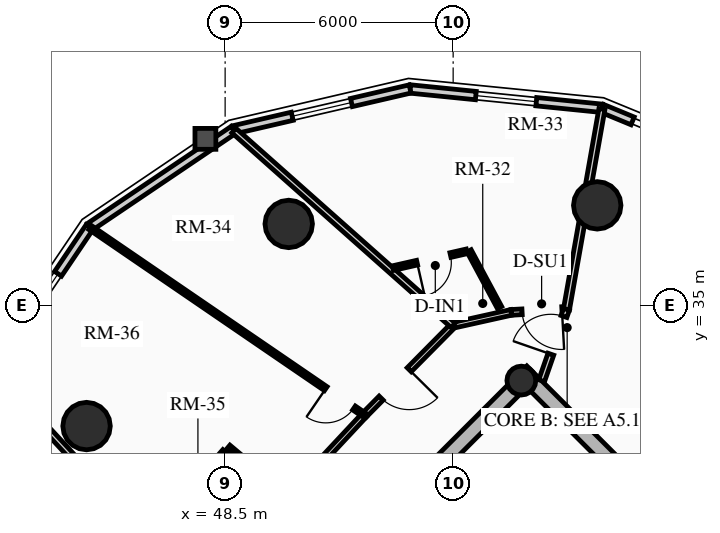
"""IFC4 building model, lengths in metres.
Left out: names, types, materials, properties, quantities, classifications, styles, units other than length and angle.
Written with IfcOpenShell. Run it as: python <this file> out.ifc"""

import sys

from ifc_helpers import new_model, si_unit, direction, frame, frame_2d, origin, origin_2d, place, context, subcontext, project, spatial, rectangle, circle, hollow_circle, extrude, source, transform, mapped, element, fill, save


model = new_model("IFC4")
c1 = context("Model", 3, precision=1e-05, world=origin(), true_north=direction((0.0, 1.0)))
c2 = subcontext(c1, "Body", "Model", "MODEL_VIEW")
j1 = project(units=[si_unit("LENGTHUNIT", "METRE"), si_unit("PLANEANGLEUNIT", "RADIAN")], contexts=[c1])
p1 = place(None, origin())
s1 = spatial("IfcSite", under=j1, at=p1, CompositionType="ELEMENT")
p2 = place(p1, origin())
s2 = spatial("IfcBuilding", under=s1, at=p2, CompositionType="ELEMENT")
p3 = place(p2, frame((0.0, 0.0, 157.42)))
s3 = spatial("IfcBuildingStorey", under=s2, at=p3, CompositionType="ELEMENT", Elevation=157.42)
p4 = place(p3, frame((66.268, 23.298, 0.0), z_axis=(0.0, 0.0, 1.0), x_axis=(-0.707106781187, 0.707106781187, 0.0)))
e1 = element("IfcWall", 1, at=p4, inside=s3, PredefinedType="SHEAR", context=c2, shape_type="SweptSolid", body=[
    extrude(rectangle(XDim=14.1, YDim=0.4, at=frame_2d((7.05, 0.0))), origin(), (0.0, 0.0, 1.0), 2.91),
])
p5 = place(p3, frame((48.873, 25.561, 0.0), z_axis=(0.0, 0.0, 1.0), x_axis=(0.707106781187, 0.707106781187, 0.0)))
e2 = element("IfcWall", 2, at=p5, inside=s3, PredefinedType="SHEAR", context=c2, shape_type="SweptSolid", body=[
    extrude(rectangle(XDim=10.7, YDim=0.4, at=frame_2d((5.35, 0.0))), origin(), (0.0, 0.0, 1.0), 2.91),
])
m1 = source(origin(), c2, "Body", "SweptSolid", [
    extrude(rectangle(XDim=1.5, YDim=2.02, at=frame_2d((0.75, 1.01))), frame((0.0, 0.21, 0.0), z_axis=(0.0, -1.0, 0.0), x_axis=(1.0, 0.0, 0.0)), (0.0, 0.0, 1.0), 0.42),
])
p6 = place(p5, frame((4.6, 0.0, 0.0)))
e3 = element("IfcOpeningElement", 3, at=p6, cuts=e2, PredefinedType="OPENING", context=c2, shape_type="MappedRepresentation", body=[
    mapped(m1, transform((0.0, 0.0, 0.0), x_axis=(1.0, 0.0, 0.0), y_axis=(0.0, 1.0, 0.0), z_axis=(0.0, 0.0, 1.0), scale=1.0)),
])
p7 = place(p3, frame((56.294, 33.024, 0.0), z_axis=(0.0, 0.0, 1.0), x_axis=(0.707106781187, 0.707106781187, 0.0)))
e4 = element("IfcColumn", 4, at=p7, inside=s3, PredefinedType="COLUMN", context=c2, shape_type="SweptSolid", body=[
    extrude(hollow_circle(Radius=0.38, WallThickness=0.032, at=origin_2d()), origin(), (0.0, 0.0, 1.0), 2.91),
])
for number, where, z_axis, x_axis in (
    (5, (58.291, 37.635, 0.0), (0.0, 0.0, 1.0), (1.0, 0.0, 0.0)),
    (6, (50.173, 37.146, 0.0), (0.0, 0.0, 1.0), (1.0, 0.0, 0.0)),
    (7, (44.854, 31.827, 0.0), (0.0, 0.0, 1.0), (1.0, 0.0, 0.0)),
):
    element("IfcColumn", number, at=place(p3, frame(where, z_axis=z_axis, x_axis=x_axis)), inside=s3, PredefinedType="USERDEFINED", context=c2, shape_type="SweptSolid", body=[
        extrude(circle(Radius=0.625, at=origin_2d()), origin(), (0.0, 0.0, 1.0), 2.91),
    ])
p8 = place(p3, frame((58.418, 40.189, 0.0), z_axis=(0.0, 0.0, 1.0), x_axis=(0.924556017656, -0.381046152345, 0.0)))
e8 = element("IfcWall", 8, at=p8, inside=s3, PredefinedType="SOLIDWALL", context=c2, shape_type="SweptSolid", body=[
    extrude(rectangle(XDim=0.87, YDim=0.22, at=frame_2d((0.435, 0.0))), origin(), (0.0, 0.0, 1.0), 2.245),
])
p9 = place(p3, frame((53.367, 40.698, 0.0), z_axis=(0.0, 0.0, 1.0), x_axis=(0.994959267396, -0.100279889424, 0.0)))
e9 = element("IfcWall", 9, at=p9, inside=s3, PredefinedType="SOLIDWALL", context=c2, shape_type="SweptSolid", body=[
    extrude(rectangle(XDim=5.076, YDim=0.22, at=frame_2d((2.538, 0.0))), origin(), (0.0, 0.0, 1.0), 2.245),
])
m2 = source(origin(), c2, "Body", "SweptSolid", [
    extrude(rectangle(XDim=1.6, YDim=1.3, at=frame_2d((0.8, 0.65))), frame((0.0, 0.12, 0.0), z_axis=(0.0, -1.0, 0.0), x_axis=(1.0, 0.0, 0.0)), (0.0, 0.0, 1.0), 0.24),
])
p10 = place(p9, frame((1.738, 0.0, 0.65)))
e10 = element("IfcOpeningElement", 10, at=p10, cuts=e9, PredefinedType="OPENING", context=c2, shape_type="MappedRepresentation", body=[
    mapped(m2, transform((0.0, 0.0, 0.0), x_axis=(1.0, 0.0, 0.0), y_axis=(0.0, 1.0, 0.0), z_axis=(0.0, 0.0, 1.0), scale=1.0)),
])
p11 = place(p3, frame((48.721, 39.622, 0.0), z_axis=(0.0, 0.0, 1.0), x_axis=(0.974206226622, 0.225659540039, 0.0)))
e11 = element("IfcWall", 11, at=p11, inside=s3, PredefinedType="SOLIDWALL", context=c2, shape_type="SweptSolid", body=[
    extrude(rectangle(XDim=4.769, YDim=0.22, at=frame_2d((2.385, 0.0))), origin(), (0.0, 0.0, 1.0), 2.245),
])
p12 = place(p11, frame((1.585, 0.0, 0.65)))
e12 = element("IfcOpeningElement", 12, at=p12, cuts=e11, PredefinedType="OPENING", context=c2, shape_type="MappedRepresentation", body=[
    mapped(m2, transform((0.0, 0.0, 0.0), x_axis=(1.0, 0.0, 0.0), y_axis=(0.0, 1.0, 0.0), z_axis=(0.0, 0.0, 1.0), scale=1.0)),
])
p13 = place(p3, frame((44.935, 37.065, 0.0), z_axis=(0.0, 0.0, 1.0), x_axis=(0.828739009952, 0.559635286042, 0.0)))
e13 = element("IfcWall", 13, at=p13, inside=s3, PredefinedType="SOLIDWALL", context=c2, shape_type="SweptSolid", body=[
    extrude(rectangle(XDim=4.569, YDim=0.22, at=frame_2d((2.284, 0.0))), origin(), (0.0, 0.0, 1.0), 2.245),
])
p14 = place(p3, frame((42.378, 33.279, 0.0), z_axis=(0.0, 0.0, 1.0), x_axis=(0.559635286042, 0.828739009952, 0.0)))
e14 = element("IfcWall", 14, at=p14, inside=s3, PredefinedType="SOLIDWALL", context=c2, shape_type="SweptSolid", body=[
    extrude(rectangle(XDim=4.569, YDim=0.22, at=frame_2d((2.284, 0.0))), origin(), (0.0, 0.0, 1.0), 2.245),
])
p15 = place(p14, frame((1.484, 0.0, 0.65)))
e15 = element("IfcOpeningElement", 15, at=p15, cuts=e14, PredefinedType="OPENING", context=c2, shape_type="MappedRepresentation", body=[
    mapped(m2, transform((0.0, 0.0, 0.0), x_axis=(1.0, 0.0, 0.0), y_axis=(0.0, 1.0, 0.0), z_axis=(0.0, 0.0, 1.0), scale=1.0)),
])
p16 = place(p3, frame((57.482, 34.899, 0.0), z_axis=(0.0, 0.0, 1.0), x_axis=(-0.998466026722, -0.055367801852, 0.0)))
e16 = element("IfcWall", 16, at=p16, inside=s3, PredefinedType="PARTITIONING", context=c2, shape_type="SweptSolid", body=[
    extrude(rectangle(XDim=1.455, YDim=0.15, at=frame_2d((0.728, 0.0))), origin(), (0.0, 0.0, 1.0), 2.245),
])
m3 = source(origin(), c2, "Body", "SweptSolid", [
    extrude(rectangle(XDim=1.05, YDim=2.015, at=frame_2d((0.525, 1.007))), frame((0.0, 0.085, 0.0), z_axis=(0.0, -1.0, 0.0), x_axis=(1.0, 0.0, 0.0)), (0.0, 0.0, 1.0), 0.17),
])
p17 = place(p16, frame((0.12, 0.0, 0.0)))
e17 = element("IfcOpeningElement", 17, at=p17, cuts=e16, PredefinedType="OPENING", context=c2, shape_type="MappedRepresentation", body=[
    mapped(m3, transform((0.0, 0.0, 0.0), x_axis=(1.0, 0.0, 0.0), y_axis=(0.0, 1.0, 0.0), z_axis=(0.0, 0.0, 1.0), scale=1.0)),
])
p18 = place(p3, frame((56.029, 34.819, 0.0), z_axis=(0.0, 0.0, 1.0), x_axis=(-0.976117289068, -0.217244189754, 0.0)))
e18 = element("IfcWall", 18, at=p18, inside=s3, PredefinedType="PARTITIONING", context=c2, shape_type="SweptSolid", body=[
    extrude(rectangle(XDim=1.565, YDim=0.15, at=frame_2d((0.783, 0.0))), origin(), (0.0, 0.0, 1.0), 2.245),
])
p19 = place(p3, frame((54.501, 34.479, 0.0), z_axis=(0.0, 0.0, 1.0), x_axis=(-0.70346073929, -0.710734119258, 0.0)))
e19 = element("IfcWall", 19, at=p19, inside=s3, PredefinedType="PARTITIONING", context=c2, shape_type="SweptSolid", body=[
    extrude(rectangle(XDim=3.323, YDim=0.15, at=frame_2d((1.662, 0.0))), origin(), (0.0, 0.0, 1.0), 2.245),
])
p20 = place(p19, frame((1.645, 0.0, 0.0)))
e20 = element("IfcOpeningElement", 20, at=p20, cuts=e19, PredefinedType="OPENING", context=c2, shape_type="MappedRepresentation", body=[
    mapped(m3, transform((0.0, 0.0, 0.0), x_axis=(1.0, 0.0, 0.0), y_axis=(0.0, 1.0, 0.0), z_axis=(0.0, 0.0, 1.0), scale=1.0)),
])
p21 = place(p3, frame((52.163, 32.117, 0.0), z_axis=(0.0, 0.0, 1.0), x_axis=(-0.682485296115, -0.730899323154, 0.0)))
e21 = element("IfcWall", 21, at=p21, inside=s3, PredefinedType="PARTITIONING", context=c2, shape_type="SweptSolid", body=[
    extrude(rectangle(XDim=6.404, YDim=0.15, at=frame_2d((3.202, 0.0))), origin(), (0.0, 0.0, 1.0), 2.245),
])
p22 = place(p3, frame((57.482, 34.899, 0.0), z_axis=(0.0, 0.0, 1.0), x_axis=(0.174251112754, 0.98470124896, 0.0)))
e22 = element("IfcWall", 22, at=p22, inside=s3, PredefinedType="PARTITIONING", context=c2, shape_type="SweptSolid", body=[
    extrude(rectangle(XDim=5.352, YDim=0.16, at=frame_2d((2.676, 0.0))), origin(), (0.0, 0.0, 1.0), 2.245),
])
p23 = place(p3, frame((54.501, 34.479, 0.0), z_axis=(0.0, 0.0, 1.0), x_axis=(-0.747641382601, 0.66410267506, 0.0)))
e23 = element("IfcWall", 23, at=p23, inside=s3, PredefinedType="PARTITIONING", context=c2, shape_type="SweptSolid", body=[
    extrude(rectangle(XDim=7.718, YDim=0.16, at=frame_2d((3.859, 0.0))), origin(), (0.0, 0.0, 1.0), 2.245),
])
p24 = place(p3, frame((47.792, 27.436, 0.0), z_axis=(0.0, 0.0, 1.0), x_axis=(-0.679077160958, 0.734066897132, 0.0)))
e24 = element("IfcWall", 24, at=p24, inside=s3, PredefinedType="PARTITIONING", context=c2, shape_type="SweptSolid", body=[
    extrude(rectangle(XDim=7.947, YDim=0.16, at=frame_2d((3.974, 0.0))), origin(), (0.0, 0.0, 1.0), 2.245),
])
p25 = place(p3, frame((56.828, 33.021, 0.0), z_axis=(0.0, 0.0, 1.0), x_axis=(0.328682472103, 0.944440486496, 0.0)))
e25 = element("IfcWall", 25, at=p25, inside=s3, PredefinedType="PARTITIONING", context=c2, shape_type="SweptSolid", body=[
    extrude(rectangle(XDim=1.989, YDim=0.16, at=frame_2d((0.995, 0.0))), origin(), (0.0, 0.0, 1.0), 2.245),
])
m4 = source(origin(), c2, "Body", "SweptSolid", [
    extrude(rectangle(XDim=1.05, YDim=2.015, at=frame_2d((0.525, 1.007))), frame((0.0, 0.09, 0.0), z_axis=(0.0, -1.0, 0.0), x_axis=(1.0, 0.0, 0.0)), (0.0, 0.0, 1.0), 0.18),
])
p26 = place(p25, frame((0.739, 0.0, 0.0)))
e26 = element("IfcOpeningElement", 26, at=p26, cuts=e25, PredefinedType="OPENING", context=c2, shape_type="MappedRepresentation", body=[
    mapped(m4, transform((0.0, 0.0, 0.0), x_axis=(1.0, 0.0, 0.0), y_axis=(0.0, 1.0, 0.0), z_axis=(0.0, 0.0, 1.0), scale=1.0)),
])
p27 = place(p3, frame((55.722, 34.944, 0.0), z_axis=(0.0, 0.0, 1.0), x_axis=(-0.473482169178, 0.880803403417, 0.0)))
e27 = element("IfcWall", 27, at=p27, inside=s3, PredefinedType="PARTITIONING", context=c2, shape_type="SweptSolid", body=[
    extrude(rectangle(XDim=1.698, YDim=0.125, at=frame_2d((0.849, 0.0))), origin(), (0.0, 0.0, 1.0), 2.245),
])
p28 = place(p3, frame((54.858, 36.425, 0.0), z_axis=(0.0, 0.0, 1.0), x_axis=(-0.975061820415, -0.221933427785, 0.0)))
e28 = element("IfcWall", 28, at=p28, inside=s3, PredefinedType="PARTITIONING", context=c2, shape_type="SweptSolid", body=[
    extrude(rectangle(XDim=1.993, YDim=0.125, at=frame_2d((0.997, 0.0))), origin(), (0.0, 0.0, 1.0), 2.312),
])
m5 = source(origin(), c2, "Body", "SweptSolid", [
    extrude(rectangle(XDim=0.9, YDim=2.005, at=frame_2d((0.45, 1.002))), frame((0.0, 0.073, 0.0), z_axis=(0.0, -1.0, 0.0), x_axis=(1.0, 0.0, 0.0)), (0.0, 0.0, 1.0), 0.145),
])
p29 = place(p28, frame((0.44, 0.0, 0.0)))
e29 = element("IfcOpeningElement", 29, at=p29, cuts=e28, PredefinedType="OPENING", context=c2, shape_type="MappedRepresentation", body=[
    mapped(m5, transform((0.0, 0.0, 0.0), x_axis=(1.0, 0.0, 0.0), y_axis=(0.0, 1.0, 0.0), z_axis=(0.0, 0.0, 1.0), scale=1.0)),
])
p30 = place(p3, frame((52.163, 32.117, 0.0), z_axis=(0.0, 0.0, 1.0), x_axis=(-0.825403853282, 0.564542716707, 0.0)))
e30 = element("IfcWall", 30, at=p30, inside=s3, PredefinedType="PARTITIONING", context=c2, shape_type="SweptSolid", body=[
    extrude(rectangle(XDim=8.74, YDim=0.125, at=frame_2d((4.37, 0.0))), origin(), (0.0, 0.0, 1.0), 2.245),
])
p31 = place(p30, frame((0.33, 0.0, 0.0)))
e31 = element("IfcOpeningElement", 31, at=p31, cuts=e30, PredefinedType="OPENING", context=c2, shape_type="MappedRepresentation", body=[
    mapped(m5, transform((0.0, 0.0, 0.0), x_axis=(1.0, 0.0, 0.0), y_axis=(0.0, 1.0, 0.0), z_axis=(0.0, 0.0, 1.0), scale=1.0)),
])
p32 = place(p3, frame((49.961, 30.124, 0.0), z_axis=(0.0, 0.0, 1.0), x_axis=(-0.766210982885, 0.64258908309, 0.0)))
e32 = element("IfcWall", 32, at=p32, inside=s3, PredefinedType="PARTITIONING", context=c2, shape_type="SweptSolid", body=[
    extrude(rectangle(XDim=1.795, YDim=0.125, at=frame_2d((0.897, 0.0))), origin(), (0.0, 0.0, 1.0), 2.675),
])
p33 = place(p3, frame((48.488, 31.166, 0.0), z_axis=(0.0, 0.0, 1.0), x_axis=(-0.660635615229, -0.750706722956, 0.0)))
e33 = element("IfcWall", 33, at=p33, inside=s3, PredefinedType="PARTITIONING", context=c2, shape_type="SweptSolid", body=[
    extrude(rectangle(XDim=2.852, YDim=0.125, at=frame_2d((1.426, 0.0))), origin(), (0.0, 0.0, 1.0), 2.245),
])
p34 = place(p33, frame((0.12, 0.0, 0.0)))
e34 = element("IfcOpeningElement", 34, at=p34, cuts=e33, PredefinedType="OPENING", context=c2, shape_type="MappedRepresentation", body=[
    mapped(m5, transform((0.0, 0.0, 0.0), x_axis=(1.0, 0.0, 0.0), y_axis=(0.0, 1.0, 0.0), z_axis=(0.0, 0.0, 1.0), scale=1.0)),
])
m6 = source(origin(), c2, "Body", "SweptSolid", [
    extrude(rectangle(XDim=1.6, YDim=1.3, at=frame_2d((0.8, 0.65))), frame((0.0, 0.03, 0.0), z_axis=(0.0, -1.0, 0.0), x_axis=(1.0, 0.0, 0.0)), (0.0, 0.0, 1.0), 0.06),
])
p35 = place(p10, origin())
e35 = element("IfcWindow", 35, at=p35, inside=s3, PartitioningType="SINGLE_PANEL", PredefinedType="WINDOW", context=c2, shape_type="MappedRepresentation", body=[
    mapped(m6, transform((0.0, 0.0, 0.0), x_axis=(1.0, 0.0, 0.0), y_axis=(0.0, 1.0, 0.0), z_axis=(0.0, 0.0, 1.0), scale=1.0)),
])
fill(e10, e35)
p36 = place(p12, origin())
e36 = element("IfcWindow", 36, at=p36, inside=s3, PartitioningType="SINGLE_PANEL", PredefinedType="WINDOW", context=c2, shape_type="MappedRepresentation", body=[
    mapped(m6, transform((0.0, 0.0, 0.0), x_axis=(1.0, 0.0, 0.0), y_axis=(0.0, 1.0, 0.0), z_axis=(0.0, 0.0, 1.0), scale=1.0)),
])
fill(e12, e36)
p37 = place(p15, origin())
e37 = element("IfcWindow", 37, at=p37, inside=s3, PartitioningType="SINGLE_PANEL", PredefinedType="WINDOW", context=c2, shape_type="MappedRepresentation", body=[
    mapped(m6, transform((0.0, 0.0, 0.0), x_axis=(1.0, 0.0, 0.0), y_axis=(0.0, 1.0, 0.0), z_axis=(0.0, 0.0, 1.0), scale=1.0)),
])
fill(e15, e37)
m7 = source(origin(), c2, "Body", "SweptSolid", [
    extrude(rectangle(XDim=1.05, YDim=2.015, at=frame_2d((0.525, 1.007))), frame((0.0, 0.025, 0.0), z_axis=(0.0, -1.0, 0.0), x_axis=(1.0, 0.0, 0.0)), (0.0, 0.0, 1.0), 0.05),
])
p38 = place(p26, origin())
e38 = element("IfcDoor", 38, at=p38, inside=s3, OperationType="SINGLE_SWING_LEFT", PredefinedType="DOOR", context=c2, shape_type="MappedRepresentation", body=[
    mapped(m7, transform((0.0, 0.0, 0.0), x_axis=(1.0, 0.0, 0.0), y_axis=(0.0, 1.0, 0.0), z_axis=(0.0, 0.0, 1.0), scale=1.0)),
])
fill(e26, e38)
p39 = place(p17, origin())
e39 = element("IfcDoor", 39, at=p39, inside=s3, OperationType="SINGLE_SWING_LEFT", PredefinedType="DOOR", context=c2, shape_type="MappedRepresentation", body=[
    mapped(m7, transform((0.0, 0.0, 0.0), x_axis=(1.0, 0.0, 0.0), y_axis=(0.0, 1.0, 0.0), z_axis=(0.0, 0.0, 1.0), scale=1.0)),
])
fill(e17, e39)
m8 = source(origin(), c2, "Body", "SweptSolid", [
    extrude(rectangle(XDim=0.9, YDim=2.005, at=frame_2d((0.45, 1.002))), frame((0.0, 0.025, 0.0), z_axis=(0.0, -1.0, 0.0), x_axis=(1.0, 0.0, 0.0)), (0.0, 0.0, 1.0), 0.05),
])
p40 = place(p29, origin())
e40 = element("IfcDoor", 40, at=p40, inside=s3, OperationType="SINGLE_SWING_RIGHT", PredefinedType="DOOR", context=c2, shape_type="MappedRepresentation", body=[
    mapped(m8, transform((0.0, 0.0, 0.0), x_axis=(1.0, 0.0, 0.0), y_axis=(0.0, 1.0, 0.0), z_axis=(0.0, 0.0, 1.0), scale=1.0)),
])
fill(e29, e40)
p41 = place(p20, origin())
e41 = element("IfcDoor", 41, at=p41, inside=s3, OperationType="SINGLE_SWING_LEFT", PredefinedType="DOOR", context=c2, shape_type="MappedRepresentation", body=[
    mapped(m7, transform((0.0, 0.0, 0.0), x_axis=(1.0, 0.0, 0.0), y_axis=(0.0, 1.0, 0.0), z_axis=(0.0, 0.0, 1.0), scale=1.0)),
])
fill(e20, e41)
p42 = place(p31, origin())
e42 = element("IfcDoor", 42, at=p42, inside=s3, OperationType="SINGLE_SWING_RIGHT", PredefinedType="DOOR", context=c2, shape_type="MappedRepresentation", body=[
    mapped(m8, transform((0.0, 0.0, 0.0), x_axis=(1.0, 0.0, 0.0), y_axis=(0.0, 1.0, 0.0), z_axis=(0.0, 0.0, 1.0), scale=1.0)),
])
fill(e31, e42)
save(model, sys.argv[1])
